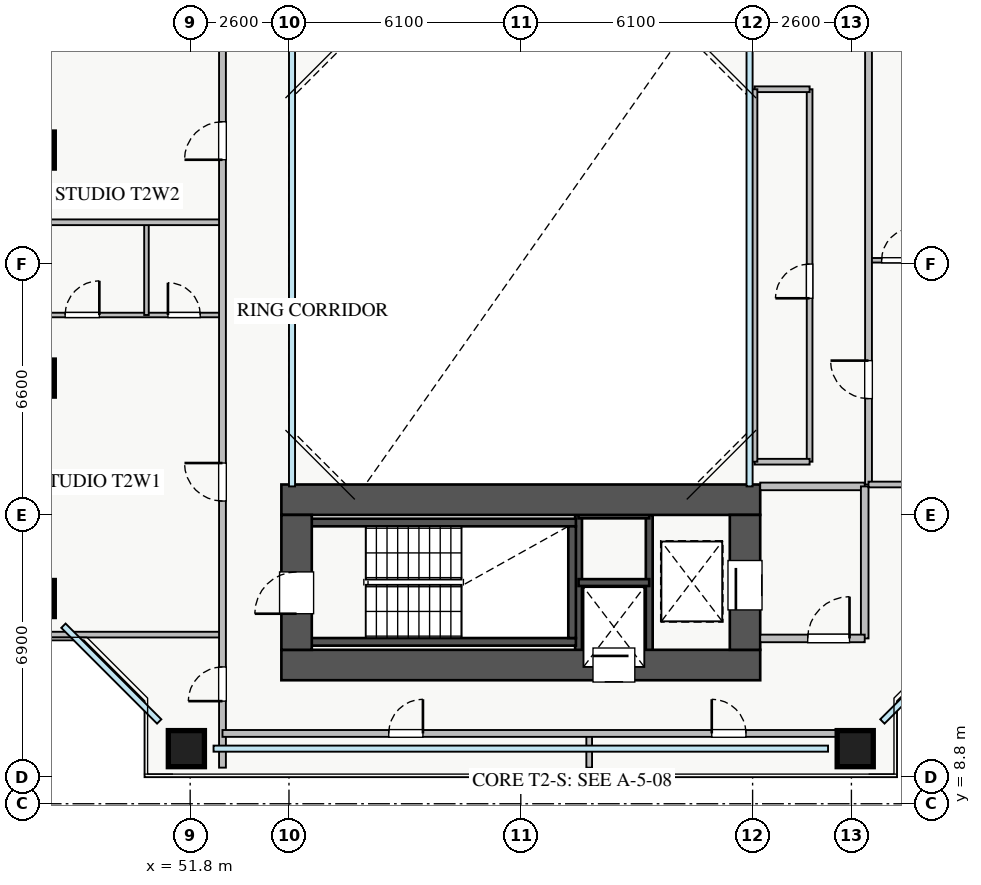
"""IFC4 building model, lengths in metres.
Left out: names, types, materials, properties, quantities, classifications, styles, units other than length and angle.
Written with IfcOpenShell. Run it as: python <this file> out.ifc"""

import sys

from ifc_helpers import new_model, si_unit, direction, frame, frame_2d, origin, origin_2d, place, context, subcontext, project, spatial, rectangle, extrude, source, transform, mapped, element, fill, save


model = new_model("IFC4")
c1 = context("Model", 3, precision=1e-05, world=origin(), true_north=direction((0.0, 1.0)))
c2 = subcontext(c1, "Body", "Model", "MODEL_VIEW")
j1 = project(units=[si_unit("LENGTHUNIT", "METRE"), si_unit("PLANEANGLEUNIT", "RADIAN")], contexts=[c1])
p1 = place(None, origin())
s1 = spatial("IfcSite", under=j1, at=p1, CompositionType="ELEMENT")
p2 = place(p1, origin())
s2 = spatial("IfcBuilding", under=s1, at=p2, CompositionType="ELEMENT")
p3 = place(p2, frame((0.0, 0.0, 42.5)))
s3 = spatial("IfcBuildingStorey", under=s2, at=p3, CompositionType="ELEMENT", Elevation=42.5)
for number, where, z_axis, x_axis in (
    (1, (62.02, 12.45, 0.0), (0.0, 0.0, 1.0), (0.0, 1.0, 0.0)),
    (2, (63.88, 12.45, 0.0), (0.0, 0.0, 1.0), (0.0, 1.0, 0.0)),
):
    element("IfcWall", number, at=place(p3, frame(where, z_axis=z_axis, x_axis=x_axis)), inside=s3, PredefinedType="SHEAR", context=c2, shape_type="SweptSolid", body=[
        extrude(rectangle(XDim=3.95, YDim=0.18, at=frame_2d((1.975, 0.0))), origin(), (0.0, 0.0, 1.0), 3.03),
    ])
for number, where, z_axis, x_axis in (
    (3, (62.02, 14.62, 0.0), (0.0, 0.0, 1.0), (1.0, 0.0, 0.0)),
    (4, (62.02, 16.4, 0.0), (0.0, 0.0, 1.0), (1.0, 0.0, 0.0)),
):
    element("IfcWall", number, at=place(p3, frame(where, z_axis=z_axis, x_axis=x_axis)), inside=s3, PredefinedType="SHEAR", context=c2, shape_type="SweptSolid", body=[
        extrude(rectangle(XDim=1.86, YDim=0.18, at=frame_2d((0.93, 0.0))), origin(), (0.0, 0.0, 1.0), 3.03),
    ])
for number, where, z_axis, x_axis in (
    (5, (54.8, 13.06, 0.0), (0.0, 0.0, 1.0), (1.0, 0.0, 0.0)),
    (6, (54.8, 16.2, 0.0), (0.0, 0.0, 1.0), (1.0, 0.0, 0.0)),
):
    element("IfcWall", number, at=place(p3, frame(where, z_axis=z_axis, x_axis=x_axis)), inside=s3, PredefinedType="SHEAR", context=c2, shape_type="SweptSolid", body=[
        extrude(rectangle(XDim=7.15, YDim=0.2, at=frame_2d((3.575, 0.0))), origin(), (0.0, 0.0, 1.0), 3.25),
    ])
p4 = place(p3, frame((61.85, 13.16, 0.0), z_axis=(0.0, 0.0, 1.0), x_axis=(0.0, 1.0, 0.0)))
e7 = element("IfcWall", 7, at=p4, inside=s3, PredefinedType="SHEAR", context=c2, shape_type="SweptSolid", body=[
    extrude(rectangle(XDim=2.94, YDim=0.2, at=frame_2d((1.47, 0.0))), origin(), (0.0, 0.0, 1.0), 3.25),
])
p5 = place(p3, frame((54.2, 12.45, 0.0), z_axis=(0.0, 0.0, 1.0), x_axis=(1.0, 0.0, 0.0)))
e8 = element("IfcWall", 8, at=p5, inside=s3, PredefinedType="SHEAR", context=c2, shape_type="SweptSolid", body=[
    extrude(rectangle(XDim=12.6, YDim=0.8, at=frame_2d((6.3, 0.0))), origin(), (0.0, 0.0, 1.0), 3.25),
])
p6 = place(p5, frame((8.2, 0.0, 0.0)))
e9 = element("IfcOpeningElement", 9, at=p6, cuts=e8, PredefinedType="OPENING", context=c2, shape_type="SweptSolid", body=[
    extrude(rectangle(XDim=1.1, YDim=2.05, at=frame_2d((0.55, 1.025))), frame((0.0, 0.41, 0.0), z_axis=(0.0, -1.0, 0.0), x_axis=(1.0, 0.0, 0.0)), (0.0, 0.0, 1.0), 0.82),
])
p7 = place(p3, frame((54.2, 16.8, 0.0), z_axis=(0.0, 0.0, 1.0), x_axis=(1.0, 0.0, 0.0)))
e10 = element("IfcWall", 10, at=p7, inside=s3, PredefinedType="SHEAR", context=c2, shape_type="SweptSolid", body=[
    extrude(rectangle(XDim=12.6, YDim=0.8, at=frame_2d((6.3, 0.0))), origin(), (0.0, 0.0, 1.0), 3.25),
])
p8 = place(p3, frame((54.6, 12.85, 0.0), z_axis=(0.0, 0.0, 1.0), x_axis=(0.0, 1.0, 0.0)))
e11 = element("IfcWall", 11, at=p8, inside=s3, PredefinedType="SHEAR", context=c2, shape_type="SweptSolid", body=[
    extrude(rectangle(XDim=3.55, YDim=0.8, at=frame_2d((1.775, 0.0))), origin(), (0.0, 0.0, 1.0), 3.25),
])
p9 = place(p8, frame((0.95, 0.0, 0.0)))
e12 = element("IfcOpeningElement", 12, at=p9, cuts=e11, PredefinedType="OPENING", context=c2, shape_type="SweptSolid", body=[
    extrude(rectangle(XDim=1.1, YDim=2.05, at=frame_2d((0.55, 1.025))), frame((0.0, 0.41, 0.0), z_axis=(0.0, -1.0, 0.0), x_axis=(1.0, 0.0, 0.0)), (0.0, 0.0, 1.0), 0.82),
])
p10 = place(p3, frame((66.4, 12.85, 0.0), z_axis=(0.0, 0.0, 1.0), x_axis=(0.0, 1.0, 0.0)))
e13 = element("IfcWall", 13, at=p10, inside=s3, PredefinedType="SHEAR", context=c2, shape_type="SweptSolid", body=[
    extrude(rectangle(XDim=3.55, YDim=0.8, at=frame_2d((1.775, 0.0))), origin(), (0.0, 0.0, 1.0), 3.25),
])
p11 = place(p10, frame((1.05, 0.0, 0.0)))
e14 = element("IfcOpeningElement", 14, at=p11, cuts=e13, PredefinedType="OPENING", context=c2, shape_type="SweptSolid", body=[
    extrude(rectangle(XDim=1.3, YDim=2.05, at=frame_2d((0.65, 1.025))), frame((0.0, 0.41, 0.0), z_axis=(0.0, -1.0, 0.0), x_axis=(1.0, 0.0, 0.0)), (0.0, 0.0, 1.0), 0.82),
])
m1 = source(origin(), c2, "Body", "SweptSolid", [
    extrude(rectangle(XDim=0.95, YDim=0.95, at=origin_2d()), origin(), (0.0, 0.0, 1.0), 3.25),
])
for number, where, z_axis, x_axis in (
    (15, (51.7, 10.25, 0.0), (0.0, 0.0, 1.0), (1.0, 0.0, 0.0)),
    (16, (69.3, 10.25, 0.0), (0.0, 0.0, 1.0), (1.0, 0.0, 0.0)),
    (17, (47.75, 14.2, 0.0), (0.0, 0.0, 1.0), (1.0, 0.0, 0.0)),
    (18, (47.75, 20.0, 0.0), (0.0, 0.0, 1.0), (1.0, 0.0, 0.0)),
    (19, (47.75, 26.0, 0.0), (0.0, 0.0, 1.0), (1.0, 0.0, 0.0)),
):
    element("IfcColumn", number, at=place(p3, frame(where, z_axis=z_axis, x_axis=x_axis)), inside=s3, PredefinedType="COLUMN", context=c2, shape_type="MappedRepresentation", body=[
        mapped(m1, transform((0.0, 0.0, 0.0), x_axis=(1.0, 0.0, 0.0), y_axis=(0.0, 1.0, 0.0), z_axis=(0.0, 0.0, 1.0), scale=1.0)),
    ])
p12 = place(p3, frame((66.8, 17.15, 0.0), z_axis=(0.0, 0.0, 1.0), x_axis=(1.0, 0.0, 0.0)))
e20 = element("IfcWall", 20, at=p12, inside=s3, PredefinedType="PARTITIONING", context=c2, shape_type="SweptSolid", body=[
    extrude(rectangle(XDim=2.75, YDim=0.2, at=frame_2d((1.375, 0.0))), origin(), (0.0, 0.0, 1.0), 3.03),
])
p13 = place(p3, frame((69.55, 13.15, 0.0), z_axis=(0.0, 0.0, 1.0), x_axis=(0.0, 1.0, 0.0)))
e21 = element("IfcWall", 21, at=p13, inside=s3, PredefinedType="PARTITIONING", context=c2, shape_type="SweptSolid", body=[
    extrude(rectangle(XDim=4.0, YDim=0.2, at=frame_2d((2.0, 0.0))), origin(), (0.0, 0.0, 1.0), 2.575),
])
p14 = place(p3, frame((66.8, 13.15, 0.0), z_axis=(0.0, 0.0, 1.0), x_axis=(1.0, 0.0, 0.0)))
e22 = element("IfcWall", 22, at=p14, inside=s3, PredefinedType="PARTITIONING", context=c2, shape_type="SweptSolid", body=[
    extrude(rectangle(XDim=2.75, YDim=0.2, at=frame_2d((1.375, 0.0))), origin(), (0.0, 0.0, 1.0), 3.03),
])
p15 = place(p14, frame((1.25, 0.0, 0.0)))
e23 = element("IfcOpeningElement", 23, at=p15, cuts=e22, PredefinedType="OPENING", context=c2, shape_type="SweptSolid", body=[
    extrude(rectangle(XDim=1.1, YDim=2.05, at=frame_2d((0.55, 1.025))), frame((0.0, 0.11, 0.0), z_axis=(0.0, -1.0, 0.0), x_axis=(1.0, 0.0, 0.0)), (0.0, 0.0, 1.0), 0.22),
])
p16 = place(p3, frame((47.25, 13.25, 0.0), z_axis=(0.0, 0.0, 1.0), x_axis=(1.0, 0.0, 0.0)))
e24 = element("IfcWall", 24, at=p16, inside=s3, PredefinedType="PARTITIONING", context=c2, shape_type="SweptSolid", body=[
    extrude(rectangle(XDim=5.4, YDim=0.15, at=frame_2d((2.7, 0.0))), origin(), (0.0, 0.0, 1.0), 3.03),
])
p17 = place(p3, frame((47.25, 21.66, 0.0), z_axis=(0.0, 0.0, 1.0), x_axis=(1.0, 0.0, 0.0)))
e25 = element("IfcWall", 25, at=p17, inside=s3, PredefinedType="PLUMBINGWALL", context=c2, shape_type="SweptSolid", body=[
    extrude(rectangle(XDim=5.4, YDim=0.12, at=frame_2d((2.7, 0.0))), origin(), (0.0, 0.0, 1.0), 3.03),
])
p18 = place(p17, frame((1.26, 0.0, 0.0)))
e26 = element("IfcOpeningElement", 26, at=p18, cuts=e25, PredefinedType="OPENING", context=c2, shape_type="SweptSolid", body=[
    extrude(rectangle(XDim=0.9, YDim=2.05, at=frame_2d((0.45, 1.025))), frame((0.0, 0.07, 0.0), z_axis=(0.0, -1.0, 0.0), x_axis=(1.0, 0.0, 0.0)), (0.0, 0.0, 1.0), 0.14),
])
p19 = place(p17, frame((3.965, 0.0, 0.0)))
e27 = element("IfcOpeningElement", 27, at=p19, cuts=e25, PredefinedType="OPENING", context=c2, shape_type="SweptSolid", body=[
    extrude(rectangle(XDim=0.85, YDim=2.05, at=frame_2d((0.425, 1.025))), frame((0.0, 0.07, 0.0), z_axis=(0.0, -1.0, 0.0), x_axis=(1.0, 0.0, 0.0)), (0.0, 0.0, 1.0), 0.14),
])
p20 = place(p3, frame((50.65, 21.66, 0.0), z_axis=(0.0, 0.0, 1.0), x_axis=(0.0, 1.0, 0.0)))
e28 = element("IfcWall", 28, at=p20, inside=s3, PredefinedType="PLUMBINGWALL", context=c2, shape_type="SweptSolid", body=[
    extrude(rectangle(XDim=2.44, YDim=0.12, at=frame_2d((1.22, 0.0))), origin(), (0.0, 0.0, 1.0), 3.03),
])
p21 = place(p3, frame((47.25, 24.1, 0.0), z_axis=(0.0, 0.0, 1.0), x_axis=(1.0, 0.0, 0.0)))
e29 = element("IfcWall", 29, at=p21, inside=s3, PredefinedType="PARTITIONING", context=c2, shape_type="SweptSolid", body=[
    extrude(rectangle(XDim=5.4, YDim=0.15, at=frame_2d((2.7, 0.0))), origin(), (0.0, 0.0, 1.0), 3.03),
])
p22 = place(p3, frame((52.65, 9.75, 0.0), z_axis=(0.0, 0.0, 1.0), x_axis=(0.0, 1.0, 0.0)))
e30 = element("IfcWall", 30, at=p22, inside=s3, PredefinedType="PARTITIONING", context=c2, shape_type="SweptSolid", body=[
    extrude(rectangle(XDim=26.5, YDim=0.18, at=frame_2d((13.25, 0.0))), origin(), (0.0, 0.0, 1.0), 3.03),
])
p23 = place(p22, frame((23.85, 0.0, 0.0)))
e31 = element("IfcOpeningElement", 31, at=p23, cuts=e30, PredefinedType="OPENING", context=c2, shape_type="SweptSolid", body=[
    extrude(rectangle(XDim=0.9, YDim=2.05, at=frame_2d((0.45, 1.025))), frame((0.0, 0.1, 0.0), z_axis=(0.0, -1.0, 0.0), x_axis=(1.0, 0.0, 0.0)), (0.0, 0.0, 1.0), 0.2),
])
p24 = place(p22, frame((1.75, 0.0, 0.0)))
e32 = element("IfcOpeningElement", 32, at=p24, cuts=e30, PredefinedType="OPENING", context=c2, shape_type="SweptSolid", body=[
    extrude(rectangle(XDim=0.9, YDim=2.05, at=frame_2d((0.45, 1.025))), frame((0.0, 0.1, 0.0), z_axis=(0.0, -1.0, 0.0), x_axis=(1.0, 0.0, 0.0)), (0.0, 0.0, 1.0), 0.2),
])
p25 = place(p22, frame((7.015, 0.0, 0.0)))
e33 = element("IfcOpeningElement", 33, at=p25, cuts=e30, PredefinedType="OPENING", context=c2, shape_type="SweptSolid", body=[
    extrude(rectangle(XDim=1.0, YDim=2.05, at=frame_2d((0.5, 1.025))), frame((0.0, 0.1, 0.0), z_axis=(0.0, -1.0, 0.0), x_axis=(1.0, 0.0, 0.0)), (0.0, 0.0, 1.0), 0.2),
])
p26 = place(p22, frame((15.995, 0.0, 0.0)))
e34 = element("IfcOpeningElement", 34, at=p26, cuts=e30, PredefinedType="OPENING", context=c2, shape_type="SweptSolid", body=[
    extrude(rectangle(XDim=1.0, YDim=2.05, at=frame_2d((0.5, 1.025))), frame((0.0, 0.1, 0.0), z_axis=(0.0, -1.0, 0.0), x_axis=(1.0, 0.0, 0.0)), (0.0, 0.0, 1.0), 0.2),
])
p27 = place(p3, frame((69.65, 23.1, 0.0), z_axis=(0.0, 0.0, 1.0), x_axis=(1.0, 0.0, 0.0)))
e35 = element("IfcWall", 35, at=p27, inside=s3, PredefinedType="PLUMBINGWALL", context=c2, shape_type="SweptSolid", body=[
    extrude(rectangle(XDim=4.1, YDim=0.12, at=frame_2d((2.05, 0.0))), origin(), (0.0, 0.0, 1.0), 2.731),
])
p28 = place(p27, frame((0.345, 0.0, 0.0)))
e36 = element("IfcOpeningElement", 36, at=p28, cuts=e35, PredefinedType="OPENING", context=c2, shape_type="SweptSolid", body=[
    extrude(rectangle(XDim=0.85, YDim=2.05, at=frame_2d((0.425, 1.025))), frame((0.0, 0.07, 0.0), z_axis=(0.0, -1.0, 0.0), x_axis=(1.0, 0.0, 0.0)), (0.0, 0.0, 1.0), 0.14),
])
p29 = place(p27, frame((2.35, 0.0, 0.0)))
e37 = element("IfcOpeningElement", 37, at=p29, cuts=e35, PredefinedType="OPENING", context=c2, shape_type="SweptSolid", body=[
    extrude(rectangle(XDim=0.9, YDim=2.05, at=frame_2d((0.45, 1.025))), frame((0.0, 0.07, 0.0), z_axis=(0.0, -1.0, 0.0), x_axis=(1.0, 0.0, 0.0)), (0.0, 0.0, 1.0), 0.14),
])
p30 = place(p3, frame((69.65, 17.2, 0.0), z_axis=(0.0, 0.0, 1.0), x_axis=(0.0, 1.0, 0.0)))
e38 = element("IfcWall", 38, at=p30, inside=s3, PredefinedType="PARTITIONING", context=c2, shape_type="SweptSolid", body=[
    extrude(rectangle(XDim=11.6, YDim=0.18, at=frame_2d((5.8, 0.0))), origin(), (0.0, 0.0, 1.0), 3.03),
])
p31 = place(p30, frame((2.26, 0.0, 0.0)))
e39 = element("IfcOpeningElement", 39, at=p31, cuts=e38, PredefinedType="OPENING", context=c2, shape_type="SweptSolid", body=[
    extrude(rectangle(XDim=1.0, YDim=2.05, at=frame_2d((0.5, 1.025))), frame((0.0, 0.1, 0.0), z_axis=(0.0, -1.0, 0.0), x_axis=(1.0, 0.0, 0.0)), (0.0, 0.0, 1.0), 0.2),
])
p32 = place(p3, frame((69.65, 17.2, 0.0), z_axis=(0.0, 0.0, 1.0), x_axis=(1.0, 0.0, 0.0)))
e40 = element("IfcWall", 40, at=p32, inside=s3, PredefinedType="PARTITIONING", context=c2, shape_type="SweptSolid", body=[
    extrude(rectangle(XDim=4.1, YDim=0.15, at=frame_2d((2.05, 0.0))), origin(), (0.0, 0.0, 1.0), 3.03),
])
p33 = place(p3, frame((68.1, 17.8, 0.0), z_axis=(0.0, 0.0, 1.0), x_axis=(0.0, 1.0, 0.0)))
e41 = element("IfcWall", 41, at=p33, inside=s3, PredefinedType="PARTITIONING", context=c2, shape_type="SweptSolid", body=[
    extrude(rectangle(XDim=9.8, YDim=0.15, at=frame_2d((4.9, 0.0))), origin(), (0.0, 0.0, 1.0), 3.03),
])
p34 = place(p33, frame((4.3, 0.0, 0.0)))
e42 = element("IfcOpeningElement", 42, at=p34, cuts=e41, PredefinedType="OPENING", context=c2, shape_type="SweptSolid", body=[
    extrude(rectangle(XDim=0.9, YDim=2.05, at=frame_2d((0.45, 1.025))), frame((0.0, 0.085, 0.0), z_axis=(0.0, -1.0, 0.0), x_axis=(1.0, 0.0, 0.0)), (0.0, 0.0, 1.0), 0.17),
])
p35 = place(p3, frame((66.65, 27.6, 0.0), z_axis=(0.0, 0.0, 1.0), x_axis=(1.0, 0.0, 0.0)))
e43 = element("IfcWall", 43, at=p35, inside=s3, PredefinedType="PARTITIONING", context=c2, shape_type="SweptSolid", body=[
    extrude(rectangle(XDim=1.45, YDim=0.15, at=frame_2d((0.725, 0.0))), origin(), (0.0, 0.0, 1.0), 2.731),
])
p36 = place(p3, frame((66.65, 17.8, 0.0), z_axis=(0.0, 0.0, 1.0), x_axis=(1.0, 0.0, 0.0)))
e44 = element("IfcWall", 44, at=p36, inside=s3, PredefinedType="PARTITIONING", context=c2, shape_type="SweptSolid", body=[
    extrude(rectangle(XDim=1.45, YDim=0.15, at=frame_2d((0.725, 0.0))), origin(), (0.0, 0.0, 1.0), 3.03),
])
p37 = place(p3, frame((66.65, 17.8, 0.0), z_axis=(0.0, 0.0, 1.0), x_axis=(0.0, 1.0, 0.0)))
e45 = element("IfcWall", 45, at=p37, inside=s3, PredefinedType="PARTITIONING", context=c2, shape_type="SweptSolid", body=[
    extrude(rectangle(XDim=9.8, YDim=0.15, at=frame_2d((4.9, 0.0))), origin(), (0.0, 0.0, 1.0), 2.625),
])
for number, where, z_axis, x_axis in (
    (46, (62.3, 9.75, 0.0), (0.0, 0.0, 1.0), (0.0, 1.0, 0.0)),
    (47, (69.65, 9.75, 0.0), (0.0, 0.0, 1.0), (0.0, 1.0, 0.0)),
):
    element("IfcWall", number, at=place(p3, frame(where, z_axis=z_axis, x_axis=x_axis)), inside=s3, PredefinedType="PARTITIONING", context=c2, shape_type="SweptSolid", body=[
        extrude(rectangle(XDim=0.9, YDim=0.15, at=frame_2d((0.45, 0.0))), origin(), (0.0, 0.0, 1.0), 3.03),
    ])
p38 = place(p3, frame((52.65, 10.65, 0.0), z_axis=(0.0, 0.0, 1.0), x_axis=(1.0, 0.0, 0.0)))
e48 = element("IfcWall", 48, at=p38, inside=s3, PredefinedType="PARTITIONING", context=c2, shape_type="SweptSolid", body=[
    extrude(rectangle(XDim=17.0, YDim=0.18, at=frame_2d((8.5, 0.0))), origin(), (0.0, 0.0, 1.0), 3.03),
])
p39 = place(p38, frame((4.375, 0.0, 0.0)))
e49 = element("IfcOpeningElement", 49, at=p39, cuts=e48, PredefinedType="OPENING", context=c2, shape_type="SweptSolid", body=[
    extrude(rectangle(XDim=0.9, YDim=2.05, at=frame_2d((0.45, 1.025))), frame((0.0, 0.1, 0.0), z_axis=(0.0, -1.0, 0.0), x_axis=(1.0, 0.0, 0.0)), (0.0, 0.0, 1.0), 0.2),
])
p40 = place(p38, frame((12.875, 0.0, 0.0)))
e50 = element("IfcOpeningElement", 50, at=p40, cuts=e48, PredefinedType="OPENING", context=c2, shape_type="SweptSolid", body=[
    extrude(rectangle(XDim=0.9, YDim=2.05, at=frame_2d((0.45, 1.025))), frame((0.0, 0.1, 0.0), z_axis=(0.0, -1.0, 0.0), x_axis=(1.0, 0.0, 0.0)), (0.0, 0.0, 1.0), 0.2),
])
m2 = source(origin(), c2, "Body", "SweptSolid", [
    extrude(rectangle(XDim=1.3, YDim=2.05, at=frame_2d((0.65, 1.025))), frame((0.0, 0.025, 0.0), z_axis=(0.0, -1.0, 0.0), x_axis=(1.0, 0.0, 0.0)), (0.0, 0.0, 1.0), 0.05),
])
p41 = place(p11, origin())
e51 = element("IfcDoor", 51, at=p41, inside=s3, OperationType="SLIDING_TO_RIGHT", PredefinedType="DOOR", context=c2, shape_type="MappedRepresentation", body=[
    mapped(m2, transform((0.0, 0.0, 0.0), x_axis=(1.0, 0.0, 0.0), y_axis=(0.0, 1.0, 0.0), z_axis=(0.0, 0.0, 1.0), scale=1.0)),
])
fill(e14, e51)
m3 = source(origin(), c2, "Body", "SweptSolid", [
    extrude(rectangle(XDim=1.1, YDim=2.05, at=frame_2d((0.55, 1.025))), frame((0.0, 0.025, 0.0), z_axis=(0.0, -1.0, 0.0), x_axis=(1.0, 0.0, 0.0)), (0.0, 0.0, 1.0), 0.05),
])
p42 = place(p9, origin())
e52 = element("IfcDoor", 52, at=p42, inside=s3, OperationType="SINGLE_SWING_LEFT", PredefinedType="DOOR", context=c2, shape_type="MappedRepresentation", body=[
    mapped(m3, transform((0.0, 0.0, 0.0), x_axis=(1.0, 0.0, 0.0), y_axis=(0.0, 1.0, 0.0), z_axis=(0.0, 0.0, 1.0), scale=1.0)),
])
fill(e12, e52)
p43 = place(p6, origin())
e53 = element("IfcDoor", 53, at=p43, inside=s3, OperationType="SLIDING_TO_RIGHT", PredefinedType="DOOR", context=c2, shape_type="MappedRepresentation", body=[
    mapped(m3, transform((0.0, 0.0, 0.0), x_axis=(1.0, 0.0, 0.0), y_axis=(0.0, 1.0, 0.0), z_axis=(0.0, 0.0, 1.0), scale=1.0)),
])
fill(e9, e53)
p44 = place(p15, origin())
e54 = element("IfcDoor", 54, at=p44, inside=s3, OperationType="SINGLE_SWING_RIGHT", PredefinedType="DOOR", context=c2, shape_type="MappedRepresentation", body=[
    mapped(m3, transform((0.0, 0.0, 0.0), x_axis=(1.0, 0.0, 0.0), y_axis=(0.0, 1.0, 0.0), z_axis=(0.0, 0.0, 1.0), scale=1.0)),
])
fill(e23, e54)
m4 = source(origin(), c2, "Body", "SweptSolid", [
    extrude(rectangle(XDim=0.9, YDim=2.05, at=frame_2d((0.45, 1.025))), frame((0.0, 0.025, 0.0), z_axis=(0.0, -1.0, 0.0), x_axis=(1.0, 0.0, 0.0)), (0.0, 0.0, 1.0), 0.05),
])
p45 = place(p18, origin())
e55 = element("IfcDoor", 55, at=p45, inside=s3, OperationType="SINGLE_SWING_RIGHT", PredefinedType="DOOR", context=c2, shape_type="MappedRepresentation", body=[
    mapped(m4, transform((0.0, 0.0, 0.0), x_axis=(1.0, 0.0, 0.0), y_axis=(0.0, 1.0, 0.0), z_axis=(0.0, 0.0, 1.0), scale=1.0)),
])
fill(e26, e55)
m5 = source(origin(), c2, "Body", "SweptSolid", [
    extrude(rectangle(XDim=0.85, YDim=2.05, at=frame_2d((0.425, 1.025))), frame((0.0, 0.025, 0.0), z_axis=(0.0, -1.0, 0.0), x_axis=(1.0, 0.0, 0.0)), (0.0, 0.0, 1.0), 0.05),
])
p46 = place(p19, origin())
e56 = element("IfcDoor", 56, at=p46, inside=s3, OperationType="SINGLE_SWING_LEFT", PredefinedType="DOOR", context=c2, shape_type="MappedRepresentation", body=[
    mapped(m5, transform((0.0, 0.0, 0.0), x_axis=(1.0, 0.0, 0.0), y_axis=(0.0, 1.0, 0.0), z_axis=(0.0, 0.0, 1.0), scale=1.0)),
])
fill(e27, e56)
p47 = place(p24, origin())
e57 = element("IfcDoor", 57, at=p47, inside=s3, OperationType="SINGLE_SWING_LEFT", PredefinedType="DOOR", context=c2, shape_type="MappedRepresentation", body=[
    mapped(m4, transform((0.0, 0.0, 0.0), x_axis=(1.0, 0.0, 0.0), y_axis=(0.0, 1.0, 0.0), z_axis=(0.0, 0.0, 1.0), scale=1.0)),
])
fill(e32, e57)
m6 = source(origin(), c2, "Body", "SweptSolid", [
    extrude(rectangle(XDim=1.0, YDim=2.05, at=frame_2d((0.5, 1.025))), frame((0.0, 0.025, 0.0), z_axis=(0.0, -1.0, 0.0), x_axis=(1.0, 0.0, 0.0)), (0.0, 0.0, 1.0), 0.05),
])
p48 = place(p25, origin())
e58 = element("IfcDoor", 58, at=p48, inside=s3, OperationType="SINGLE_SWING_RIGHT", PredefinedType="DOOR", context=c2, shape_type="MappedRepresentation", body=[
    mapped(m6, transform((0.0, 0.0, 0.0), x_axis=(1.0, 0.0, 0.0), y_axis=(0.0, 1.0, 0.0), z_axis=(0.0, 0.0, 1.0), scale=1.0)),
])
fill(e33, e58)
p49 = place(p26, origin())
e59 = element("IfcDoor", 59, at=p49, inside=s3, OperationType="SINGLE_SWING_LEFT", PredefinedType="DOOR", context=c2, shape_type="MappedRepresentation", body=[
    mapped(m6, transform((0.0, 0.0, 0.0), x_axis=(1.0, 0.0, 0.0), y_axis=(0.0, 1.0, 0.0), z_axis=(0.0, 0.0, 1.0), scale=1.0)),
])
fill(e34, e59)
p50 = place(p28, origin())
e60 = element("IfcDoor", 60, at=p50, inside=s3, OperationType="SINGLE_SWING_RIGHT", PredefinedType="DOOR", context=c2, shape_type="MappedRepresentation", body=[
    mapped(m5, transform((0.0, 0.0, 0.0), x_axis=(1.0, 0.0, 0.0), y_axis=(0.0, 1.0, 0.0), z_axis=(0.0, 0.0, 1.0), scale=1.0)),
])
fill(e36, e60)
p51 = place(p31, origin())
e61 = element("IfcDoor", 61, at=p51, inside=s3, OperationType="SINGLE_SWING_RIGHT", PredefinedType="DOOR", context=c2, shape_type="MappedRepresentation", body=[
    mapped(m6, transform((0.0, 0.0, 0.0), x_axis=(1.0, 0.0, 0.0), y_axis=(0.0, 1.0, 0.0), z_axis=(0.0, 0.0, 1.0), scale=1.0)),
])
fill(e39, e61)
p52 = place(p34, origin())
e62 = element("IfcDoor", 62, at=p52, inside=s3, OperationType="SINGLE_SWING_LEFT", PredefinedType="DOOR", context=c2, shape_type="MappedRepresentation", body=[
    mapped(m4, transform((0.0, 0.0, 0.0), x_axis=(1.0, 0.0, 0.0), y_axis=(0.0, 1.0, 0.0), z_axis=(0.0, 0.0, 1.0), scale=1.0)),
])
fill(e42, e62)
p53 = place(p39, origin())
e63 = element("IfcDoor", 63, at=p53, inside=s3, OperationType="SINGLE_SWING_RIGHT", PredefinedType="DOOR", context=c2, shape_type="MappedRepresentation", body=[
    mapped(m4, transform((0.0, 0.0, 0.0), x_axis=(1.0, 0.0, 0.0), y_axis=(0.0, 1.0, 0.0), z_axis=(0.0, 0.0, 1.0), scale=1.0)),
])
fill(e49, e63)
p54 = place(p40, origin())
e64 = element("IfcDoor", 64, at=p54, inside=s3, OperationType="SINGLE_SWING_LEFT", PredefinedType="DOOR", context=c2, shape_type="MappedRepresentation", body=[
    mapped(m4, transform((0.0, 0.0, 0.0), x_axis=(1.0, 0.0, 0.0), y_axis=(0.0, 1.0, 0.0), z_axis=(0.0, 0.0, 1.0), scale=1.0)),
])
fill(e50, e64)
save(model, sys.argv[1])
